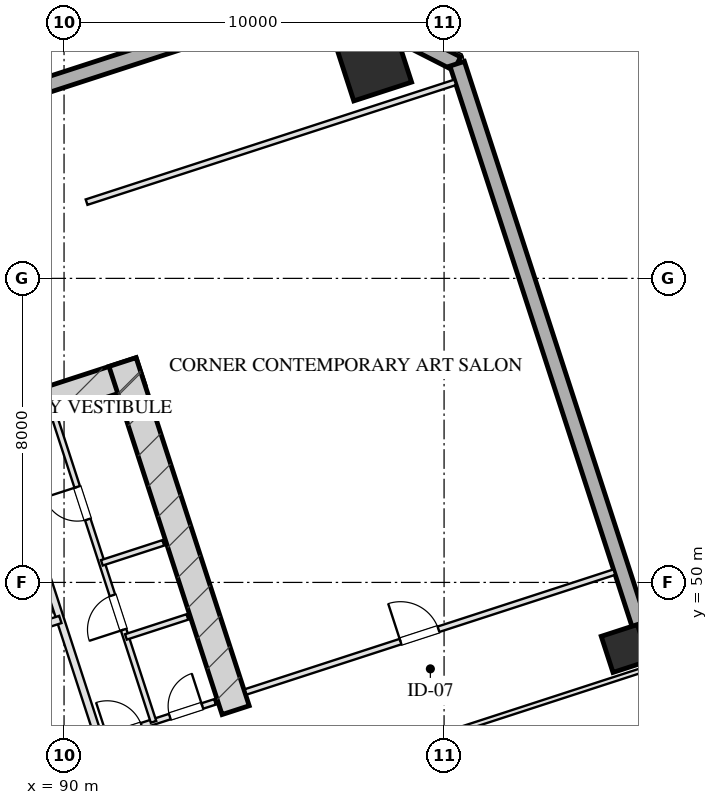
"""IFC4 building model, lengths in metres.
Left out: names, types, materials, properties, quantities, classifications, styles, units other than length and angle.
Written with IfcOpenShell. Run it as: python <this file> out.ifc"""

import sys

from ifc_helpers import new_model, si_unit, direction, frame, frame_2d, origin, origin_2d, place, context, subcontext, project, spatial, rectangle, hollow_rectangle, extrude, element, fill, save


model = new_model("IFC4")
c1 = context("Model", 3, precision=1e-05, world=origin(), true_north=direction((0.0, 1.0)))
c2 = subcontext(c1, "Body", "Model", "MODEL_VIEW")
j1 = project(units=[si_unit("LENGTHUNIT", "METRE"), si_unit("PLANEANGLEUNIT", "RADIAN")], contexts=[c1])
p1 = place(None, origin())
s1 = spatial("IfcSite", under=j1, at=p1, CompositionType="ELEMENT")
p2 = place(p1, origin())
s2 = spatial("IfcBuilding", under=s1, at=p2, CompositionType="ELEMENT")
p3 = place(p2, frame((0.0, 0.0, 54.05)))
s3 = spatial("IfcBuildingStorey", under=s2, at=p3, CompositionType="ELEMENT", Elevation=54.05)
p4 = place(p3, frame((76.272, 50.443, 0.0), z_axis=(0.0, 0.0, 1.0), x_axis=(0.951056072937, 0.309018358888, 0.0)))
e1 = element("IfcWall", 1, at=p4, inside=s3, PredefinedType="SHEAR", context=c2, shape_type="SweptSolid", body=[
    extrude(rectangle(XDim=16.55, YDim=0.75, at=frame_2d((8.275, 0.0))), origin(), (0.0, 0.0, 1.0), 3.45),
])
p5 = place(p3, frame((94.515, 46.639, 0.0), z_axis=(0.0, 0.0, 1.0), x_axis=(-0.309016134813, 0.951056795583, 0.0)))
e2 = element("IfcWall", 2, at=p5, inside=s3, PredefinedType="SHEAR", context=c2, shape_type="SweptSolid", body=[
    extrude(rectangle(XDim=9.63, YDim=0.75, at=frame_2d((4.815, 0.0))), origin(), (0.0, 0.0, 1.0), 3.45),
])
p6 = place(p3, frame((98.137, 63.677, 0.0), z_axis=(0.0, 0.0, 1.0), x_axis=(0.951056516295, 0.309016994375, 0.0)))
e3 = element("IfcColumn", 3, at=p6, inside=s3, PredefinedType="COLUMN", context=c2, shape_type="SweptSolid", body=[
    extrude(hollow_rectangle(XDim=1.6, YDim=1.6, WallThickness=0.055, at=origin_2d()), origin(), (0.0, 0.0, 1.0), 3.451),
])
p7 = place(p3, frame((104.766, 48.261, 0.0), z_axis=(0.0, 0.0, 1.0), x_axis=(0.951056516295, 0.309016994375, 0.0)))
e4 = element("IfcColumn", 4, at=p7, inside=s3, PredefinedType="COLUMN", context=c2, shape_type="SweptSolid", body=[
    extrude(hollow_rectangle(XDim=1.0, YDim=1.0, WallThickness=0.036, at=origin_2d()), origin(), (0.0, 0.0, 1.0), 3.451),
])
p8 = place(p3, frame((66.002, 55.433, 0.0), z_axis=(0.0, 0.0, 1.0), x_axis=(0.951055939317, 0.309018770125, 0.0)))
e5 = element("IfcWall", 5, at=p8, inside=s3, PredefinedType="SOLIDWALL", context=c2, shape_type="SweptSolid", body=[
    extrude(rectangle(XDim=32.4, YDim=0.4, at=frame_2d((16.2, 0.0))), origin(), (0.0, 0.0, 1.0), 2.61),
])
p9 = place(p3, frame((96.816, 65.446, 0.0), z_axis=(0.0, 0.0, 1.0), x_axis=(0.890998089617, -0.454007053137, 0.0)))
e6 = element("IfcWall", 6, at=p9, inside=s3, PredefinedType="SOLIDWALL", context=c2, shape_type="SweptSolid", body=[
    extrude(rectangle(XDim=3.96, YDim=0.4, at=frame_2d((1.98, 0.0))), origin(), (0.0, 0.0, 1.0), 2.61),
])
p10 = place(p3, frame((100.345, 63.648, 0.0), z_axis=(0.0, 0.0, 1.0), x_axis=(0.309014526607, -0.951057318118, 0.0)))
e7 = element("IfcWall", 7, at=p10, inside=s3, PredefinedType="SOLIDWALL", context=c2, shape_type="SweptSolid", body=[
    extrude(rectangle(XDim=50.0, YDim=0.4, at=frame_2d((25.0, 0.0))), origin(), (0.0, 0.0, 1.0), 2.61),
])
p11 = place(p3, frame((90.928, 45.868, 0.0), z_axis=(0.0, 0.0, 1.0), x_axis=(-0.309042196757, 0.951048327176, 0.0)))
e8 = element("IfcWall", 8, at=p11, inside=s3, PredefinedType="PARTITIONING", context=c2, shape_type="SweptSolid", body=[
    extrude(rectangle(XDim=8.43, YDim=0.2, at=frame_2d((4.215, 0.0))), origin(), (0.0, 0.0, 1.0), 3.175),
])
p12 = place(p3, frame((85.718, 47.666, 0.0), z_axis=(0.0, 0.0, 1.0), x_axis=(0.951058531764, 0.30901079133, 0.0)))
e9 = element("IfcWall", 9, at=p12, inside=s3, PredefinedType="PARTITIONING", context=c2, shape_type="SweptSolid", body=[
    extrude(rectangle(XDim=4.4, YDim=0.2, at=frame_2d((2.2, 0.0))), origin(), (0.0, 0.0, 1.0), 3.175),
])
p13 = place(p12, frame((0.45, 0.0, 0.0)))
e10 = element("IfcOpeningElement", 10, at=p13, cuts=e9, PredefinedType="OPENING", context=c2, shape_type="SweptSolid", body=[
    extrude(rectangle(XDim=1.1, YDim=2.05, at=frame_2d((0.55, 1.025))), frame((0.0, 0.11, 0.0), z_axis=(0.0, -1.0, 0.0), x_axis=(1.0, 0.0, 0.0)), (0.0, 0.0, 1.0), 0.22),
])
p14 = place(p12, frame((2.55, 0.0, 0.0)))
e11 = element("IfcOpeningElement", 11, at=p14, cuts=e9, PredefinedType="OPENING", context=c2, shape_type="SweptSolid", body=[
    extrude(rectangle(XDim=1.1, YDim=2.05, at=frame_2d((0.55, 1.025))), frame((0.0, 0.11, 0.0), z_axis=(0.0, -1.0, 0.0), x_axis=(1.0, 0.0, 0.0)), (0.0, 0.0, 1.0), 0.22),
])
p15 = place(p3, frame((90.928, 45.868, 0.0), z_axis=(0.0, 0.0, 1.0), x_axis=(0.951059297078, 0.309008435874, 0.0)))
e12 = element("IfcWall", 12, at=p15, inside=s3, PredefinedType="PARTITIONING", context=c2, shape_type="SweptSolid", body=[
    extrude(rectangle(XDim=3.2, YDim=0.15, at=frame_2d((1.6, 0.0))), origin(), (0.0, 0.0, 1.0), 3.175),
])
p16 = place(p15, frame((0.22, 0.0, 0.0)))
e13 = element("IfcOpeningElement", 13, at=p16, cuts=e12, PredefinedType="OPENING", context=c2, shape_type="SweptSolid", body=[
    extrude(rectangle(XDim=0.95, YDim=2.05, at=frame_2d((0.475, 1.025))), frame((0.0, 0.085, 0.0), z_axis=(0.0, -1.0, 0.0), x_axis=(1.0, 0.0, 0.0)), (0.0, 0.0, 1.0), 0.17),
])
p17 = place(p15, frame((1.95, 0.0, 0.0)))
e14 = element("IfcOpeningElement", 14, at=p17, cuts=e12, PredefinedType="OPENING", context=c2, shape_type="SweptSolid", body=[
    extrude(rectangle(XDim=0.9, YDim=2.05, at=frame_2d((0.45, 1.025))), frame((0.0, 0.085, 0.0), z_axis=(0.0, -1.0, 0.0), x_axis=(1.0, 0.0, 0.0)), (0.0, 0.0, 1.0), 0.17),
])
p18 = place(p3, frame((92.355, 46.331, 0.0), z_axis=(0.0, 0.0, 1.0), x_axis=(-0.309007490203, 0.951059604335, 0.0)))
e15 = element("IfcWall", 15, at=p18, inside=s3, PredefinedType="PARTITIONING", context=c2, shape_type="SweptSolid", body=[
    extrude(rectangle(XDim=8.43, YDim=0.15, at=frame_2d((4.215, 0.0))), origin(), (0.0, 0.0, 1.0), 3.175),
])
p19 = place(p18, frame((2.55, 0.0, 0.0)))
e16 = element("IfcOpeningElement", 16, at=p19, cuts=e15, PredefinedType="OPENING", context=c2, shape_type="SweptSolid", body=[
    extrude(rectangle(XDim=0.95, YDim=2.05, at=frame_2d((0.475, 1.025))), frame((0.0, 0.085, 0.0), z_axis=(0.0, -1.0, 0.0), x_axis=(1.0, 0.0, 0.0)), (0.0, 0.0, 1.0), 0.17),
])
p20 = place(p18, frame((5.6, 0.0, 0.0)))
e17 = element("IfcOpeningElement", 17, at=p20, cuts=e15, PredefinedType="OPENING", context=c2, shape_type="SweptSolid", body=[
    extrude(rectangle(XDim=0.9, YDim=2.05, at=frame_2d((0.45, 1.025))), frame((0.0, 0.085, 0.0), z_axis=(0.0, -1.0, 0.0), x_axis=(1.0, 0.0, 0.0)), (0.0, 0.0, 1.0), 0.17),
])
p21 = place(p3, frame((90.995, 50.516, 0.0), z_axis=(0.0, 0.0, 1.0), x_axis=(0.951040401051, 0.309066587596, 0.0)))
e18 = element("IfcWall", 18, at=p21, inside=s3, PredefinedType="PARTITIONING", context=c2, shape_type="SweptSolid", body=[
    extrude(rectangle(XDim=1.7, YDim=0.15, at=frame_2d((0.85, 0.0))), origin(), (0.0, 0.0, 1.0), 3.175),
])
p22 = place(p3, frame((91.628, 48.566, 0.0), z_axis=(0.0, 0.0, 1.0), x_axis=(0.951054116971, 0.309024378638, 0.0)))
e19 = element("IfcWall", 19, at=p22, inside=s3, PredefinedType="PARTITIONING", context=c2, shape_type="SweptSolid", body=[
    extrude(rectangle(XDim=1.7, YDim=0.15, at=frame_2d((0.85, 0.0))), origin(), (0.0, 0.0, 1.0), 3.175),
])
p23 = place(p3, frame((90.593, 60.006, 0.0), z_axis=(0.0, 0.0, 1.0), x_axis=(0.951059043131, 0.309009217467, 0.0)))
e20 = element("IfcWall", 20, at=p23, inside=s3, PredefinedType="PARTITIONING", context=c2, shape_type="SweptSolid", body=[
    extrude(rectangle(XDim=10.2, YDim=0.15, at=frame_2d((5.1, 0.0))), origin(), (0.0, 0.0, 1.0), 3.175),
])
p24 = place(p3, frame((94.78, 47.119, 0.0), z_axis=(0.0, 0.0, 1.0), x_axis=(0.951054294345, 0.309023832749, 0.0)))
e21 = element("IfcWall", 21, at=p24, inside=s3, PredefinedType="PARTITIONING", context=c2, shape_type="SweptSolid", body=[
    extrude(rectangle(XDim=10.2, YDim=0.15, at=frame_2d((5.1, 0.0))), origin(), (0.0, 0.0, 1.0), 3.175),
])
p25 = place(p24, frame((4.284, 0.0, 0.0)))
e22 = element("IfcOpeningElement", 22, at=p25, cuts=e21, PredefinedType="OPENING", context=c2, shape_type="SweptSolid", body=[
    extrude(rectangle(XDim=1.05, YDim=2.05, at=frame_2d((0.525, 1.025))), frame((0.0, 0.085, 0.0), z_axis=(0.0, -1.0, 0.0), x_axis=(1.0, 0.0, 0.0)), (0.0, 0.0, 1.0), 0.17),
])
p26 = place(p3, frame((88.404, 42.229, 0.0), z_axis=(0.0, 0.0, 1.0), x_axis=(0.951054152931, 0.309024267966, 0.0)))
e23 = element("IfcWall", 23, at=p26, inside=s3, PredefinedType="PARTITIONING", context=c2, shape_type="SweptSolid", body=[
    extrude(rectangle(XDim=17.775, YDim=0.12, at=frame_2d((8.888, 0.0))), origin(), (0.0, 0.0, 1.0), 3.175),
])
p27 = place(p16, origin())
e24 = element("IfcDoor", 24, at=p27, inside=s3, OperationType="SINGLE_SWING_LEFT", PredefinedType="DOOR", context=c2, shape_type="SweptSolid", body=[
    extrude(rectangle(XDim=0.95, YDim=2.05, at=frame_2d((0.475, 1.025))), frame((0.0, 0.025, 0.0), z_axis=(0.0, -1.0, 0.0), x_axis=(1.0, 0.0, 0.0)), (0.0, 0.0, 1.0), 0.05),
])
fill(e13, e24)
p28 = place(p17, origin())
e25 = element("IfcDoor", 25, at=p28, inside=s3, OperationType="SINGLE_SWING_RIGHT", PredefinedType="DOOR", context=c2, shape_type="SweptSolid", body=[
    extrude(rectangle(XDim=0.9, YDim=2.05, at=frame_2d((0.45, 1.025))), frame((0.0, 0.025, 0.0), z_axis=(0.0, -1.0, 0.0), x_axis=(1.0, 0.0, 0.0)), (0.0, 0.0, 1.0), 0.05),
])
fill(e14, e25)
p29 = place(p19, origin())
e26 = element("IfcDoor", 26, at=p29, inside=s3, OperationType="SINGLE_SWING_LEFT", PredefinedType="DOOR", context=c2, shape_type="SweptSolid", body=[
    extrude(rectangle(XDim=0.95, YDim=2.05, at=frame_2d((0.475, 1.025))), frame((0.0, 0.025, 0.0), z_axis=(0.0, -1.0, 0.0), x_axis=(1.0, 0.0, 0.0)), (0.0, 0.0, 1.0), 0.05),
])
fill(e16, e26)
p30 = place(p20, origin())
e27 = element("IfcDoor", 27, at=p30, inside=s3, OperationType="SINGLE_SWING_RIGHT", PredefinedType="DOOR", context=c2, shape_type="SweptSolid", body=[
    extrude(rectangle(XDim=0.9, YDim=2.05, at=frame_2d((0.45, 1.025))), frame((0.0, 0.025, 0.0), z_axis=(0.0, -1.0, 0.0), x_axis=(1.0, 0.0, 0.0)), (0.0, 0.0, 1.0), 0.05),
])
fill(e17, e27)
p31 = place(p25, origin())
e28 = element("IfcDoor", 28, at=p31, inside=s3, OperationType="SINGLE_SWING_LEFT", PredefinedType="DOOR", context=c2, shape_type="SweptSolid", body=[
    extrude(rectangle(XDim=1.05, YDim=2.05, at=frame_2d((0.525, 1.025))), frame((0.0, 0.025, 0.0), z_axis=(0.0, -1.0, 0.0), x_axis=(1.0, 0.0, 0.0)), (0.0, 0.0, 1.0), 0.05),
])
fill(e22, e28)
save(model, sys.argv[1])
